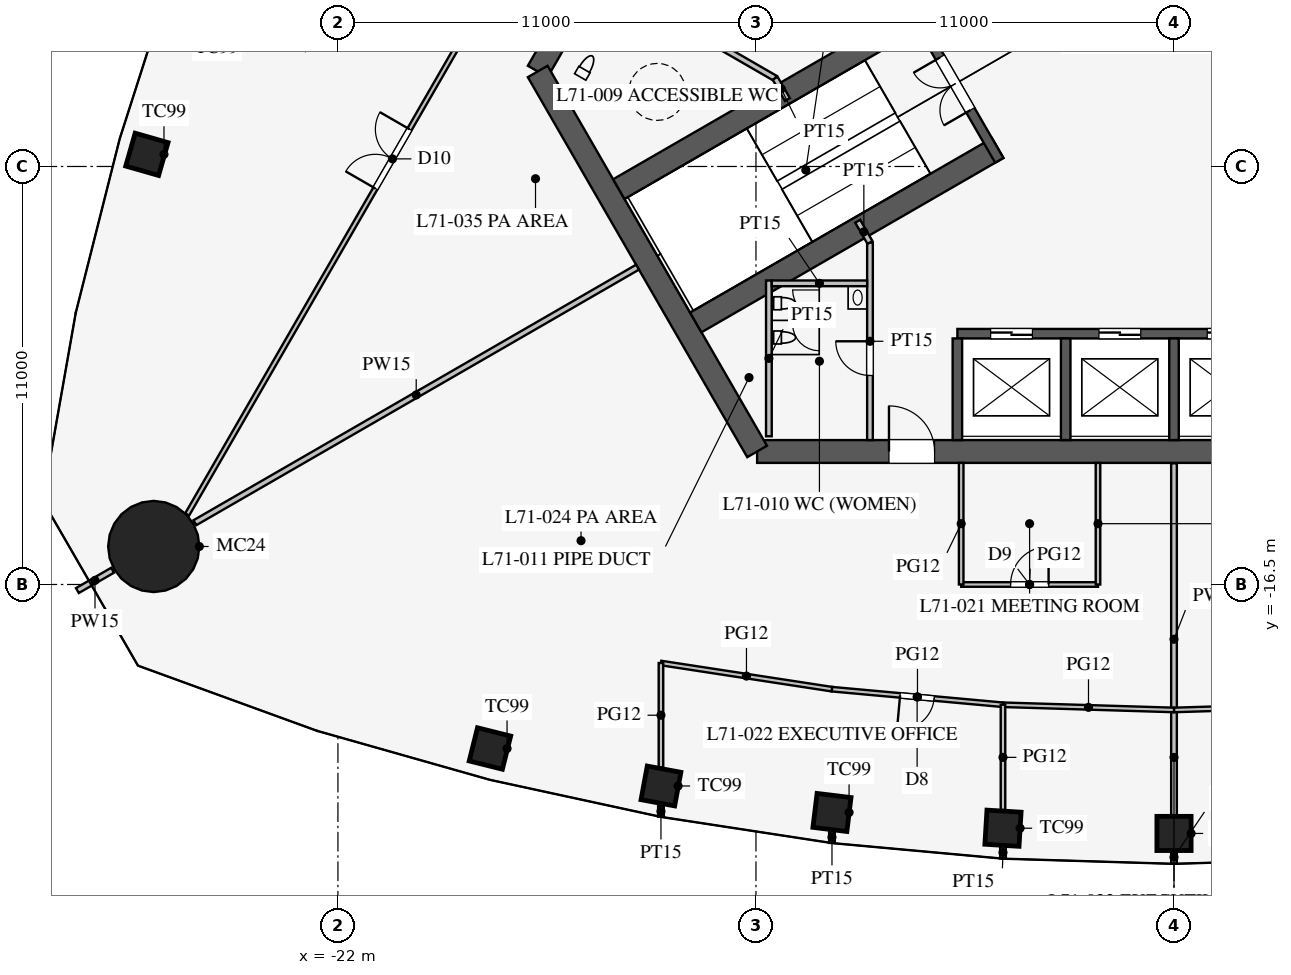
"""IFC4 building model, lengths in metres.
Left out: names, types, materials, properties, quantities, classifications, styles, units other than length and angle.
Written with IfcOpenShell. Run it as: python <this file> out.ifc"""

import sys

from ifc_helpers import new_model, si_unit, direction, frame, frame_2d, origin, origin_2d, place, context, subcontext, project, spatial, rectangle, circle, extrude, element, fill, save


model = new_model("IFC4")
c1 = context("Model", 3, precision=1e-05, world=origin(), true_north=direction((0.0, 1.0)))
c2 = subcontext(c1, "Body", "Model", "MODEL_VIEW")
j1 = project(units=[si_unit("LENGTHUNIT", "METRE"), si_unit("PLANEANGLEUNIT", "RADIAN")], contexts=[c1])
p1 = place(None, origin())
s1 = spatial("IfcSite", under=j1, at=p1, CompositionType="ELEMENT")
p2 = place(p1, origin())
s2 = spatial("IfcBuilding", under=s1, at=p2, CompositionType="ELEMENT")
p3 = place(p2, frame((0.0, 0.0, 309.9)))
s3 = spatial("IfcBuildingStorey", under=s2, at=p3, CompositionType="ELEMENT", Elevation=309.9)
for number, where, z_axis, x_axis in (
    (1, (-18.0, -20.816, 0.0), (0.0, 0.0, 1.0), (0.97, -0.242, 0.0)),
    (2, (-13.5, -21.803, 0.0), (0.0, 0.0, 1.0), (0.983, -0.182, 0.0)),
    (3, (-9.0, -22.499, 0.0), (0.0, 0.0, 1.0), (0.993, -0.121, 0.0)),
    (4, (-4.5, -22.914, 0.0), (0.0, 0.0, 1.0), (0.998, -0.061, 0.0)),
    (5, (0.0, -23.052, 0.0), (0.0, 0.0, 1.0), (1.0, 0.0, 0.0)),
    (6, (-27.027, -5.18, 0.0), (0.0, 0.0, 1.0), (-0.275, -0.961, 0.0)),
):
    element("IfcColumn", number, at=place(p3, frame(where, z_axis=z_axis, x_axis=x_axis)), inside=s3, PredefinedType="COLUMN", context=c2, shape_type="SweptSolid", body=[
        extrude(rectangle(XDim=0.9, YDim=0.9, at=origin_2d()), origin(), (0.0, 0.0, 1.0), 4.2),
    ])
p4 = place(p3, frame((-26.847, -15.5, 0.0), z_axis=(0.0, 0.0, 1.0), x_axis=(1.0, 0.0, 0.0)))
e7 = element("IfcColumn", 7, at=p4, inside=s3, PredefinedType="COLUMN", context=c2, shape_type="SweptSolid", body=[
    extrude(circle(Radius=1.2, at=origin_2d()), origin(), (0.0, 0.0, 1.0), 4.2),
])
p5 = place(p3, frame((-10.97, -13.0, 0.0), z_axis=(0.0, 0.0, 1.0), x_axis=(1.0, 0.0, 0.0)))
e8 = element("IfcWall", 8, at=p5, inside=s3, PredefinedType="SHEAR", context=c2, shape_type="SweptSolid", body=[
    extrude(rectangle(XDim=21.939, YDim=0.6, at=frame_2d((10.97, 0.0))), origin(), (0.0, 0.0, 1.0), 4.2),
])
p6 = place(p5, frame((17.27, 0.0, 0.0)))
e9 = element("IfcOpeningElement", 9, at=p6, cuts=e8, PredefinedType="OPENING", context=c2, shape_type="SweptSolid", body=[
    extrude(rectangle(XDim=1.2, YDim=2.1, at=frame_2d((0.6, 1.05))), frame((0.0, 0.31, 0.0), z_axis=(0.0, -1.0, 0.0), x_axis=(1.0, 0.0, 0.0)), (0.0, 0.0, 1.0), 0.62),
])
p7 = place(p5, frame((3.47, 0.0, 0.0)))
e10 = element("IfcOpeningElement", 10, at=p7, cuts=e8, PredefinedType="OPENING", context=c2, shape_type="SweptSolid", body=[
    extrude(rectangle(XDim=1.2, YDim=2.1, at=frame_2d((0.6, 1.05))), frame((0.0, 0.31, 0.0), z_axis=(0.0, -1.0, 0.0), x_axis=(1.0, 0.0, 0.0)), (0.0, 0.0, 1.0), 0.62),
])
p8 = place(p3, frame((-5.773, 16.0, 0.0), z_axis=(0.0, 0.0, 1.0), x_axis=(-0.500002442456, -0.866023993627, 0.0)))
e11 = element("IfcWall", 11, at=p8, inside=s3, PredefinedType="SHEAR", context=c2, shape_type="SweptSolid", body=[
    extrude(rectangle(XDim=21.939, YDim=0.6, at=frame_2d((10.97, 0.0))), origin(), (0.0, 0.0, 1.0), 4.2),
])
p9 = place(p8, frame((17.27, 0.0, 0.0)))
e12 = element("IfcOpeningElement", 12, at=p9, cuts=e11, PredefinedType="OPENING", context=c2, shape_type="SweptSolid", body=[
    extrude(rectangle(XDim=1.2, YDim=2.1, at=frame_2d((0.6, 1.05))), frame((0.0, 0.31, 0.0), z_axis=(0.0, -1.0, 0.0), x_axis=(1.0, 0.0, 0.0)), (0.0, 0.0, 1.0), 0.62),
])
p10 = place(p8, frame((3.47, 0.0, 0.0)))
e13 = element("IfcOpeningElement", 13, at=p10, cuts=e11, PredefinedType="OPENING", context=c2, shape_type="SweptSolid", body=[
    extrude(rectangle(XDim=1.2, YDim=2.1, at=frame_2d((0.6, 1.05))), frame((0.0, 0.31, 0.0), z_axis=(0.0, -1.0, 0.0), x_axis=(1.0, 0.0, 0.0)), (0.0, 0.0, 1.0), 0.62),
])
p11 = place(p3, frame((-16.743, -3.0, 0.0), z_axis=(0.0, 0.0, 1.0), x_axis=(0.499995765644, -0.866027848477, 0.0)))
e14 = element("IfcWall", 14, at=p11, inside=s3, PredefinedType="SHEAR", context=c2, shape_type="SweptSolid", body=[
    extrude(rectangle(XDim=11.547, YDim=0.6, at=frame_2d((5.773, 0.0))), origin(), (0.0, 0.0, 1.0), 4.2),
])
p12 = place(p3, frame((-5.7, -9.9, 0.0), z_axis=(0.0, 0.0, 1.0), x_axis=(1.0, 0.0, 0.0)))
e15 = element("IfcWall", 15, at=p12, inside=s3, PredefinedType="SHEAR", context=c2, shape_type="SweptSolid", body=[
    extrude(rectangle(XDim=11.4, YDim=0.25, at=frame_2d((5.7, 0.0))), origin(), (0.0, 0.0, 1.0), 4.2),
])
p13 = place(p12, frame((0.875, 0.0, 0.0)))
e16 = element("IfcOpeningElement", 16, at=p13, cuts=e15, PredefinedType="OPENING", context=c2, shape_type="SweptSolid", body=[
    extrude(rectangle(XDim=1.1, YDim=2.2, at=frame_2d((0.55, 1.1))), frame((0.0, 0.135, 0.0), z_axis=(0.0, -1.0, 0.0), x_axis=(1.0, 0.0, 0.0)), (0.0, 0.0, 1.0), 0.27),
])
p14 = place(p12, frame((3.725, 0.0, 0.0)))
e17 = element("IfcOpeningElement", 17, at=p14, cuts=e15, PredefinedType="OPENING", context=c2, shape_type="SweptSolid", body=[
    extrude(rectangle(XDim=1.1, YDim=2.2, at=frame_2d((0.55, 1.1))), frame((0.0, 0.135, 0.0), z_axis=(0.0, -1.0, 0.0), x_axis=(1.0, 0.0, 0.0)), (0.0, 0.0, 1.0), 0.27),
])
p15 = place(p12, frame((6.575, 0.0, 0.0)))
e18 = element("IfcOpeningElement", 18, at=p15, cuts=e15, PredefinedType="OPENING", context=c2, shape_type="SweptSolid", body=[
    extrude(rectangle(XDim=1.1, YDim=2.2, at=frame_2d((0.55, 1.1))), frame((0.0, 0.135, 0.0), z_axis=(0.0, -1.0, 0.0), x_axis=(1.0, 0.0, 0.0)), (0.0, 0.0, 1.0), 0.27),
])
p16 = place(p12, frame((9.425, 0.0, 0.0)))
e19 = element("IfcOpeningElement", 19, at=p16, cuts=e15, PredefinedType="OPENING", context=c2, shape_type="SweptSolid", body=[
    extrude(rectangle(XDim=1.1, YDim=2.2, at=frame_2d((0.55, 1.1))), frame((0.0, 0.135, 0.0), z_axis=(0.0, -1.0, 0.0), x_axis=(1.0, 0.0, 0.0)), (0.0, 0.0, 1.0), 0.27),
])
for number, where, z_axis, x_axis in (
    (20, (-5.7, -10.025, 0.0), (0.0, 0.0, 1.0), (0.0, -1.0, 0.0)),
    (21, (-2.85, -10.025, 0.0), (0.0, 0.0, 1.0), (0.0, -1.0, 0.0)),
    (22, (0.0, -10.025, 0.0), (0.0, 0.0, 1.0), (0.0, -1.0, 0.0)),
):
    element("IfcWall", number, at=place(p3, frame(where, z_axis=z_axis, x_axis=x_axis)), inside=s3, PredefinedType="SHEAR", context=c2, shape_type="SweptSolid", body=[
        extrude(rectangle(XDim=2.675, YDim=0.25, at=frame_2d((1.337, 0.0))), origin(), (0.0, 0.0, 1.0), 4.2),
    ])
p17 = place(p3, frame((-6.663, -1.509, 0.0), z_axis=(0.0, 0.0, 1.0), x_axis=(-0.86603049496, -0.499991181721, 0.0)))
e23 = element("IfcWall", 23, at=p17, inside=s3, PredefinedType="SHEAR", context=c2, shape_type="SweptSolid", body=[
    extrude(rectangle(XDim=9.175, YDim=0.6, at=frame_2d((4.587, 0.0))), origin(), (0.0, 0.0, 1.0), 4.2),
])
p18 = place(p3, frame((-4.638, -5.016, 0.0), z_axis=(0.0, 0.0, 1.0), x_axis=(-0.866012320003, -0.50002266109, 0.0)))
e24 = element("IfcWall", 24, at=p18, inside=s3, PredefinedType="SHEAR", context=c2, shape_type="SweptSolid", body=[
    extrude(rectangle(XDim=9.175, YDim=0.6, at=frame_2d((4.587, 0.0))), origin(), (0.0, 0.0, 1.0), 4.2),
])
p19 = place(p3, frame((-6.922, -1.312, 0.0), z_axis=(0.0, 0.0, 1.0), x_axis=(0.499984536904, -0.866034331223, 0.0)))
e25 = element("IfcWall", 25, at=p19, inside=s3, PredefinedType="SHEAR", context=c2, shape_type="SweptSolid", body=[
    extrude(rectangle(XDim=4.65, YDim=0.25, at=frame_2d((2.325, 0.0))), origin(), (0.0, 0.0, 1.0), 4.2),
])
p20 = place(p19, frame((1.525, 0.0, 0.0)))
e26 = element("IfcOpeningElement", 26, at=p20, cuts=e25, PredefinedType="OPENING", context=c2, shape_type="SweptSolid", body=[
    extrude(rectangle(XDim=1.6, YDim=2.1, at=frame_2d((0.8, 1.05))), frame((0.0, 0.135, 0.0), z_axis=(0.0, -1.0, 0.0), x_axis=(1.0, 0.0, 0.0)), (0.0, 0.0, 1.0), 0.27),
])
p21 = place(p3, frame((-8.0, -7.5, 0.0), z_axis=(0.0, 0.0, 1.0), x_axis=(0.0, -1.0, 0.0)))
e27 = element("IfcWall", 27, at=p21, inside=s3, PredefinedType="PARTITIONING", context=c2, shape_type="SweptSolid", body=[
    extrude(rectangle(XDim=5.2, YDim=0.15, at=frame_2d((2.6, 0.0))), origin(), (0.0, 0.0, 1.0), 4.0),
])
p22 = place(p21, frame((2.6, 0.0, 0.0)))
e28 = element("IfcOpeningElement", 28, at=p22, cuts=e27, PredefinedType="OPENING", context=c2, shape_type="SweptSolid", body=[
    extrude(rectangle(XDim=0.9, YDim=2.1, at=frame_2d((0.45, 1.05))), frame((0.0, 0.085, 0.0), z_axis=(0.0, -1.0, 0.0), x_axis=(1.0, 0.0, 0.0)), (0.0, 0.0, 1.0), 0.17),
])
p23 = place(p3, frame((-10.495, -3.178, 0.0), z_axis=(0.0, 0.0, 1.0), x_axis=(-0.866021400173, 0.500006934395, 0.0)))
e29 = element("IfcWall", 29, at=p23, inside=s3, PredefinedType="PARTITIONING", context=c2, shape_type="SweptSolid", body=[
    extrude(rectangle(XDim=5.2, YDim=0.15, at=frame_2d((2.6, 0.0))), origin(), (0.0, 0.0, 1.0), 4.0),
])
p24 = place(p23, frame((2.6, 0.0, 0.0)))
e30 = element("IfcOpeningElement", 30, at=p24, cuts=e29, PredefinedType="OPENING", context=c2, shape_type="SweptSolid", body=[
    extrude(rectangle(XDim=0.9, YDim=2.1, at=frame_2d((0.45, 1.05))), frame((0.0, 0.085, 0.0), z_axis=(0.0, -1.0, 0.0), x_axis=(1.0, 0.0, 0.0)), (0.0, 0.0, 1.0), 0.17),
])
for number, where, z_axis, x_axis in (
    (31, (-10.495, -3.178, 0.0), (0.0, 0.0, 1.0), (0.5, -0.866, 0.0)),
    (32, (-8.0, -7.5, 0.0), (0.0, 0.0, 1.0), (-0.5, 0.866, 0.0)),
):
    element("IfcWall", number, at=place(p3, frame(where, z_axis=z_axis, x_axis=x_axis)), inside=s3, PredefinedType="PARTITIONING", context=c2, shape_type="SweptSolid", body=[
        extrude(rectangle(XDim=0.645, YDim=0.15, at=frame_2d((0.323, 0.0))), origin(), (0.0, 0.0, 1.0), 4.0),
    ])
p25 = place(p3, frame((-10.66, -8.5, 0.0), z_axis=(0.0, 0.0, 1.0), x_axis=(0.0, -1.0, 0.0)))
e33 = element("IfcWall", 33, at=p25, inside=s3, PredefinedType="PARTITIONING", context=c2, shape_type="SweptSolid", body=[
    extrude(rectangle(XDim=4.1, YDim=0.15, at=frame_2d((2.05, 0.0))), origin(), (0.0, 0.0, 1.0), 4.0),
])
p26 = place(p3, frame((-8.075, -8.575, 0.0), z_axis=(0.0, 0.0, 1.0), x_axis=(-1.0, 0.0, 0.0)))
e34 = element("IfcWall", 34, at=p26, inside=s3, PredefinedType="PARTITIONING", context=c2, shape_type="SweptSolid", body=[
    extrude(rectangle(XDim=2.51, YDim=0.15, at=frame_2d((1.255, 0.0))), origin(), (0.0, 0.0, 1.0), 4.0),
])
p27 = place(p3, frame((-14.116, -8.15, 0.0), z_axis=(0.0, 0.0, 1.0), x_axis=(-0.866020541135, -0.500008422262, 0.0)))
e35 = element("IfcWall", 35, at=p27, inside=s3, PredefinedType="PARTITIONING", context=c2, shape_type="SweptSolid", body=[
    extrude(rectangle(XDim=13.45, YDim=0.15, at=frame_2d((6.725, 0.0))), origin(), (0.0, 0.0, 1.0), 2.5),
])
p28 = place(p3, frame((-27.929, -16.125, 0.0), z_axis=(0.0, 0.0, 1.0), x_axis=(-0.866086810508, -0.499893625349, 0.0)))
e36 = element("IfcWall", 36, at=p28, inside=s3, PredefinedType="PARTITIONING", context=c2, shape_type="SweptSolid", body=[
    extrude(rectangle(XDim=1.07, YDim=0.15, at=frame_2d((0.535, 0.0))), origin(), (0.0, 0.0, 1.0), 2.5),
])
p29 = place(p3, frame((0.0, -13.31, 0.0), z_axis=(0.0, 0.0, 1.0), x_axis=(0.0, -1.0, 0.0)))
e37 = element("IfcWall", 37, at=p29, inside=s3, PredefinedType="PARTITIONING", context=c2, shape_type="SweptSolid", body=[
    extrude(rectangle(XDim=9.261, YDim=0.15, at=frame_2d((4.631, 0.0))), origin(), (0.0, 0.0, 1.0), 3.3),
])
p30 = place(p3, frame((-5.6, -16.5, 0.0), z_axis=(0.0, 0.0, 1.0), x_axis=(1.0, 0.0, 0.0)))
e38 = element("IfcWall", 38, at=p30, inside=s3, PredefinedType="PARTITIONING", context=c2, shape_type="SweptSolid", body=[
    extrude(rectangle(XDim=3.6, YDim=0.12, at=frame_2d((1.8, 0.0))), origin(), (0.0, 0.0, 1.0), 2.9),
])
p31 = place(p30, frame((1.3, 0.0, 0.15)))
e39 = element("IfcOpeningElement", 39, at=p31, cuts=e38, PredefinedType="OPENING", context=c2, shape_type="SweptSolid", body=[
    extrude(rectangle(XDim=1.0, YDim=2.1, at=frame_2d((0.5, 1.05))), frame((0.0, 0.07, 0.0), z_axis=(0.0, -1.0, 0.0), x_axis=(1.0, 0.0, 0.0)), (0.0, 0.0, 1.0), 0.14),
])
for number, where, z_axis, x_axis in (
    (40, (-2.0, -13.3, 0.0), (0.0, 0.0, 1.0), (0.0, -1.0, 0.0)),
    (41, (-5.6, -13.3, 0.0), (0.0, 0.0, 1.0), (0.0, -1.0, 0.0)),
):
    element("IfcWall", number, at=place(p3, frame(where, z_axis=z_axis, x_axis=x_axis)), inside=s3, PredefinedType="PARTITIONING", context=c2, shape_type="SweptSolid", body=[
        extrude(rectangle(XDim=3.2, YDim=0.12, at=frame_2d((1.6, 0.0))), origin(), (0.0, 0.0, 1.0), 2.9),
    ])
p32 = place(p3, frame((0.0, -23.506, 0.0), z_axis=(0.0, 0.0, 1.0), x_axis=(0.0, -1.0, 0.0)))
e42 = element("IfcWall", 42, at=p32, inside=s3, PredefinedType="PARTITIONING", context=c2, shape_type="SweptSolid", body=[
    extrude(rectangle(XDim=0.341, YDim=0.15, at=frame_2d((0.17, 0.0))), origin(), (0.0, 0.0, 1.0), 2.9),
])
p33 = place(p3, frame((-13.5, -22.331, 0.0), z_axis=(0.0, 0.0, 1.0), x_axis=(0.0, -1.0, 0.0)))
e43 = element("IfcWall", 43, at=p33, inside=s3, PredefinedType="PARTITIONING", context=c2, shape_type="SweptSolid", body=[
    extrude(rectangle(XDim=0.28, YDim=0.15, at=frame_2d((0.14, 0.0))), origin(), (0.0, 0.0, 1.0), 2.9),
])
p34 = place(p3, frame((-4.5, -23.394, 0.0), z_axis=(0.0, 0.0, 1.0), x_axis=(0.0, -1.0, 0.0)))
e44 = element("IfcWall", 44, at=p34, inside=s3, PredefinedType="PARTITIONING", context=c2, shape_type="SweptSolid", body=[
    extrude(rectangle(XDim=0.316, YDim=0.15, at=frame_2d((0.158, 0.0))), origin(), (0.0, 0.0, 1.0), 2.9),
])
p35 = place(p3, frame((-9.0, -23.004, 0.0), z_axis=(0.0, 0.0, 1.0), x_axis=(0.0, -1.0, 0.0)))
e45 = element("IfcWall", 45, at=p35, inside=s3, PredefinedType="PARTITIONING", context=c2, shape_type="SweptSolid", body=[
    extrude(rectangle(XDim=0.296, YDim=0.15, at=frame_2d((0.148, 0.0))), origin(), (0.0, 0.0, 1.0), 2.9),
])
p36 = place(p3, frame((0.0, -19.802, 0.0), z_axis=(0.0, 0.0, 1.0), x_axis=(0.999542074227, 0.030259574513, 0.0)))
e46 = element("IfcWall", 46, at=p36, inside=s3, PredefinedType="PARTITIONING", context=c2, shape_type="SweptSolid", body=[
    extrude(rectangle(XDim=4.502, YDim=0.12, at=frame_2d((2.251, 0.0))), origin(), (0.0, 0.0, 1.0), 2.9),
])
p37 = place(p36, frame((1.8, 0.0, 0.15)))
e47 = element("IfcOpeningElement", 47, at=p37, cuts=e46, PredefinedType="OPENING", context=c2, shape_type="SweptSolid", body=[
    extrude(rectangle(XDim=0.9, YDim=2.1, at=frame_2d((0.45, 1.05))), frame((0.0, 0.07, 0.0), z_axis=(0.0, -1.0, 0.0), x_axis=(1.0, 0.0, 0.0)), (0.0, 0.0, 1.0), 0.14),
])
p38 = place(p3, frame((-13.5, -18.566, 0.0), z_axis=(0.0, 0.0, 1.0), x_axis=(0.988481794406, -0.151339823341, 0.0)))
e48 = element("IfcWall", 48, at=p38, inside=s3, PredefinedType="PARTITIONING", context=c2, shape_type="SweptSolid", body=[
    extrude(rectangle(XDim=4.552, YDim=0.12, at=frame_2d((2.276, 0.0))), origin(), (0.0, 0.0, 1.0), 2.9),
])
p39 = place(p3, frame((-4.5, -19.665, 0.0), z_axis=(0.0, 0.0, 1.0), x_axis=(0.999542074227, -0.030259574513, 0.0)))
e49 = element("IfcWall", 49, at=p39, inside=s3, PredefinedType="PARTITIONING", context=c2, shape_type="SweptSolid", body=[
    extrude(rectangle(XDim=4.502, YDim=0.12, at=frame_2d((2.251, 0.0))), origin(), (0.0, 0.0, 1.0), 2.9),
])
p40 = place(p3, frame((-9.0, -19.255, 0.0), z_axis=(0.0, 0.0, 1.0), x_axis=(0.995871921504, -0.090769576179, 0.0)))
e50 = element("IfcWall", 50, at=p40, inside=s3, PredefinedType="PARTITIONING", context=c2, shape_type="SweptSolid", body=[
    extrude(rectangle(XDim=4.519, YDim=0.12, at=frame_2d((2.259, 0.0))), origin(), (0.0, 0.0, 1.0), 2.9),
])
p41 = place(p40, frame((1.8, 0.0, 0.15)))
e51 = element("IfcOpeningElement", 51, at=p41, cuts=e50, PredefinedType="OPENING", context=c2, shape_type="SweptSolid", body=[
    extrude(rectangle(XDim=0.9, YDim=2.1, at=frame_2d((0.45, 1.05))), frame((0.0, 0.07, 0.0), z_axis=(0.0, -1.0, 0.0), x_axis=(1.0, 0.0, 0.0)), (0.0, 0.0, 1.0), 0.14),
])
p42 = place(p3, frame((-13.5, -18.566, 0.0), z_axis=(0.0, 0.0, 1.0), x_axis=(0.0, -1.0, 0.0)))
e52 = element("IfcWall", 52, at=p42, inside=s3, PredefinedType="PARTITIONING", context=c2, shape_type="SweptSolid", body=[
    extrude(rectangle(XDim=2.749, YDim=0.12, at=frame_2d((1.374, 0.0))), origin(), (0.0, 0.0, 1.0), 2.9),
])
p43 = place(p3, frame((-4.5, -19.665, 0.0), z_axis=(0.0, 0.0, 1.0), x_axis=(0.0, -1.0, 0.0)))
e53 = element("IfcWall", 53, at=p43, inside=s3, PredefinedType="PARTITIONING", context=c2, shape_type="SweptSolid", body=[
    extrude(rectangle(XDim=2.768, YDim=0.12, at=frame_2d((1.384, 0.0))), origin(), (0.0, 0.0, 1.0), 2.9),
])
p44 = place(p3, frame((-0.29, 29.818, 0.0), z_axis=(0.0, 0.0, 1.0), x_axis=(-0.500000361757, -0.866025194924, 0.0)))
e54 = element("IfcWall", 54, at=p44, inside=s3, PredefinedType="PARTITIONING", context=c2, shape_type="SweptSolid", body=[
    extrude(rectangle(XDim=51.355, YDim=0.12, at=frame_2d((25.678, 0.0))), origin(), (0.0, 0.0, 1.0), 2.9),
])
p45 = place(p44, frame((9.9, 0.0, 0.15)))
e55 = element("IfcOpeningElement", 55, at=p45, cuts=e54, PredefinedType="OPENING", context=c2, shape_type="SweptSolid", body=[
    extrude(rectangle(XDim=1.8, YDim=2.1, at=frame_2d((0.9, 1.05))), frame((0.0, 0.07, 0.0), z_axis=(0.0, -1.0, 0.0), x_axis=(1.0, 0.0, 0.0)), (0.0, 0.0, 1.0), 0.14),
])
p46 = place(p44, frame((39.65, 0.0, 0.15)))
e56 = element("IfcOpeningElement", 56, at=p46, cuts=e54, PredefinedType="OPENING", context=c2, shape_type="SweptSolid", body=[
    extrude(rectangle(XDim=1.8, YDim=2.1, at=frame_2d((0.9, 1.05))), frame((0.0, 0.07, 0.0), z_axis=(0.0, -1.0, 0.0), x_axis=(1.0, 0.0, 0.0)), (0.0, 0.0, 1.0), 0.14),
])
p47 = place(p22, frame((0.9, 0.0, 0.0), z_axis=(0.0, 0.0, 1.0), x_axis=(-1.0, 0.0, 0.0)))
e57 = element("IfcDoor", 57, at=p47, inside=s3, OperationType="SINGLE_SWING_RIGHT", PredefinedType="DOOR", context=c2, shape_type="SweptSolid", body=[
    extrude(rectangle(XDim=0.9, YDim=2.1, at=frame_2d((0.45, 1.05))), frame((0.0, 0.025, 0.0), z_axis=(0.0, -1.0, 0.0), x_axis=(1.0, 0.0, 0.0)), (0.0, 0.0, 1.0), 0.05),
])
fill(e28, e57)
p48 = place(p20, frame((1.6, 0.0, 0.0), z_axis=(0.0, 0.0, 1.0), x_axis=(-1.0, 0.0, 0.0)))
e58 = element("IfcDoor", 58, at=p48, inside=s3, OperationType="DOUBLE_DOOR_SINGLE_SWING", PredefinedType="DOOR", context=c2, shape_type="SweptSolid", body=[
    extrude(rectangle(XDim=1.6, YDim=2.1, at=frame_2d((0.8, 1.05))), frame((0.0, 0.025, 0.0), z_axis=(0.0, -1.0, 0.0), x_axis=(1.0, 0.0, 0.0)), (0.0, 0.0, 1.0), 0.05),
])
fill(e26, e58)
p49 = place(p7, origin())
e59 = element("IfcDoor", 59, at=p49, inside=s3, OperationType="SINGLE_SWING_LEFT", PredefinedType="DOOR", context=c2, shape_type="SweptSolid", body=[
    extrude(rectangle(XDim=1.2, YDim=2.1, at=frame_2d((0.6, 1.05))), frame((0.0, 0.025, 0.0), z_axis=(0.0, -1.0, 0.0), x_axis=(1.0, 0.0, 0.0)), (0.0, 0.0, 1.0), 0.05),
])
fill(e10, e59)
p50 = place(p31, origin())
e60 = element("IfcDoor", 60, at=p50, inside=s3, OperationType="SINGLE_SWING_RIGHT", PredefinedType="DOOR", context=c2, shape_type="SweptSolid", body=[
    extrude(rectangle(XDim=1.0, YDim=2.1, at=frame_2d((0.5, 1.05))), frame((0.0, 0.025, 0.0), z_axis=(0.0, -1.0, 0.0), x_axis=(1.0, 0.0, 0.0)), (0.0, 0.0, 1.0), 0.05),
])
fill(e39, e60)
p51 = place(p41, frame((0.9, 0.0, 0.0), z_axis=(0.0, 0.0, 1.0), x_axis=(-1.0, 0.0, 0.0)))
e61 = element("IfcDoor", 61, at=p51, inside=s3, OperationType="SINGLE_SWING_RIGHT", PredefinedType="DOOR", context=c2, shape_type="SweptSolid", body=[
    extrude(rectangle(XDim=0.9, YDim=2.1, at=frame_2d((0.45, 1.05))), frame((0.0, 0.025, 0.0), z_axis=(0.0, -1.0, 0.0), x_axis=(1.0, 0.0, 0.0)), (0.0, 0.0, 1.0), 0.05),
])
fill(e51, e61)
p52 = place(p46, frame((1.8, 0.0, 0.0), z_axis=(0.0, 0.0, 1.0), x_axis=(-1.0, 0.0, 0.0)))
e62 = element("IfcDoor", 62, at=p52, inside=s3, OperationType="DOUBLE_DOOR_SINGLE_SWING", PredefinedType="DOOR", context=c2, shape_type="SweptSolid", body=[
    extrude(rectangle(XDim=1.8, YDim=2.1, at=frame_2d((0.9, 1.05))), frame((0.0, 0.025, 0.0), z_axis=(0.0, -1.0, 0.0), x_axis=(1.0, 0.0, 0.0)), (0.0, 0.0, 1.0), 0.05),
])
fill(e56, e62)
p53 = place(p13, origin())
e63 = element("IfcDoor", 63, at=p53, inside=s3, OperationType="DOUBLE_DOOR_SLIDING", PredefinedType="DOOR", context=c2, shape_type="SweptSolid", body=[
    extrude(rectangle(XDim=1.1, YDim=2.2, at=frame_2d((0.55, 1.1))), frame((0.0, 0.025, 0.0), z_axis=(0.0, -1.0, 0.0), x_axis=(1.0, 0.0, 0.0)), (0.0, 0.0, 1.0), 0.05),
])
fill(e16, e63)
p54 = place(p14, origin())
e64 = element("IfcDoor", 64, at=p54, inside=s3, OperationType="DOUBLE_DOOR_SLIDING", PredefinedType="DOOR", context=c2, shape_type="SweptSolid", body=[
    extrude(rectangle(XDim=1.1, YDim=2.2, at=frame_2d((0.55, 1.1))), frame((0.0, 0.025, 0.0), z_axis=(0.0, -1.0, 0.0), x_axis=(1.0, 0.0, 0.0)), (0.0, 0.0, 1.0), 0.05),
])
fill(e17, e64)
p55 = place(p15, origin())
e65 = element("IfcDoor", 65, at=p55, inside=s3, OperationType="DOUBLE_DOOR_SLIDING", PredefinedType="DOOR", context=c2, shape_type="SweptSolid", body=[
    extrude(rectangle(XDim=1.1, YDim=2.2, at=frame_2d((0.55, 1.1))), frame((0.0, 0.025, 0.0), z_axis=(0.0, -1.0, 0.0), x_axis=(1.0, 0.0, 0.0)), (0.0, 0.0, 1.0), 0.05),
])
fill(e18, e65)
save(model, sys.argv[1])
